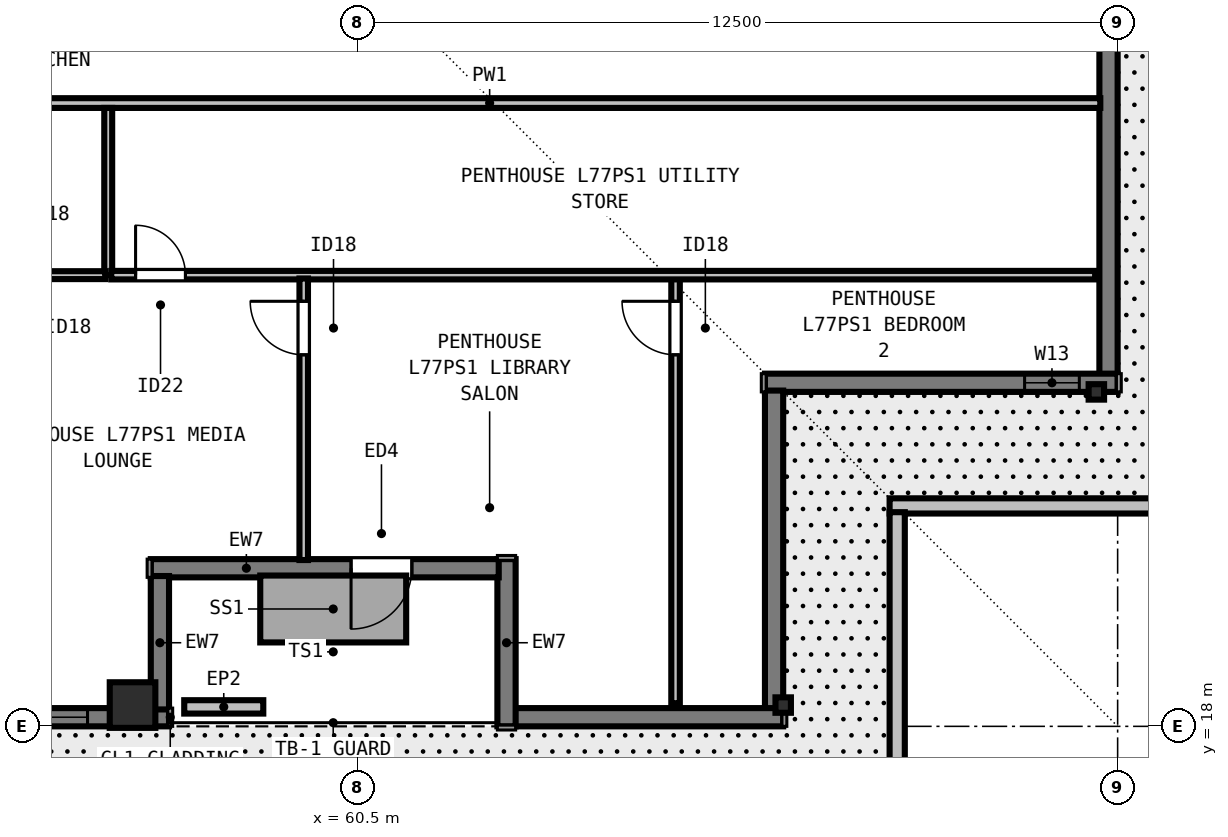
"""IFC4 building model, lengths in metres.
Left out: names, types, materials, properties, quantities, classifications, styles, units other than length and angle.
Written with IfcOpenShell. Run it as: python <this file> out.ifc"""

import sys

from ifc_helpers import new_model, si_unit, direction, frame, frame_2d, origin, origin_2d, place, context, subcontext, project, spatial, rectangle, i_section, extrude, element, fill, save


model = new_model("IFC4")
c1 = context("Model", 3, precision=1e-05, world=origin(), true_north=direction((0.0, 1.0)))
c2 = subcontext(c1, "Body", "Model", "MODEL_VIEW")
j1 = project(units=[si_unit("LENGTHUNIT", "METRE"), si_unit("PLANEANGLEUNIT", "RADIAN")], contexts=[c1])
p1 = place(None, origin())
s1 = spatial("IfcSite", under=j1, at=p1, CompositionType="ELEMENT")
p2 = place(p1, origin())
s2 = spatial("IfcBuilding", under=s1, at=p2, CompositionType="ELEMENT")
p3 = place(p2, frame((0.0, 0.0, 280.5)))
s3 = spatial("IfcBuildingStorey", under=s2, at=p3, CompositionType="ELEMENT", Elevation=280.5)
p4 = place(p3, frame((56.8, 18.35, 0.0), z_axis=(0.0, 0.0, 1.0), x_axis=(1.0, 0.0, 0.0)))
e1 = element("IfcColumn", 1, at=p4, inside=s3, PredefinedType="COLUMN", context=c2, shape_type="SweptSolid", body=[
    extrude(rectangle(XDim=0.75, YDim=0.75, at=origin_2d()), origin(), (0.0, 0.0, 1.0), 3.5),
])
for number, where, z_axis, x_axis in (
    (2, (67.5, 18.35, 0.0), (0.0, 0.0, 1.0), (1.0, 0.0, 0.0)),
    (3, (72.65, 23.5, 0.0), (0.0, 0.0, 1.0), (0.0, 1.0, 0.0)),
):
    element("IfcColumn", number, at=place(p3, frame(where, z_axis=z_axis, x_axis=x_axis)), inside=s3, PredefinedType="COLUMN", context=c2, shape_type="SweptSolid", body=[
        extrude(i_section(OverallWidth=0.254, OverallDepth=0.254, WebThickness=0.009, FlangeThickness=0.014, FilletRadius=0.013, at=origin_2d()), origin(), (0.0, 0.0, 1.0), 3.5),
    ])
p5 = place(p3, frame((74.5, 21.625, 0.0), z_axis=(0.0, 0.0, 1.0), x_axis=(-1.0, 0.0, 0.0)))
e4 = element("IfcWall", 4, at=p5, inside=s3, PredefinedType="PARAPET", context=c2, shape_type="SweptSolid", body=[
    extrude(rectangle(XDim=5.25, YDim=0.25, at=frame_2d((2.625, 0.0))), origin(), (0.0, 0.0, 1.0), 1.15),
])
p6 = place(p3, frame((69.375, 21.522, 0.0), z_axis=(0.0, 0.0, 1.0), x_axis=(0.0, -1.0, 0.0)))
e5 = element("IfcWall", 5, at=p6, inside=s3, PredefinedType="PARAPET", context=c2, shape_type="SweptSolid", body=[
    extrude(rectangle(XDim=4.794, YDim=0.25, at=frame_2d((2.397, 0.0))), origin(), (0.0, 0.0, 1.0), 1.15),
])
p7 = place(p3, frame((57.4, 18.15, 0.0), z_axis=(0.0, 0.0, 1.0), x_axis=(-1.0, 0.0, 0.0)))
e6 = element("IfcWall", 6, at=p7, inside=s3, PredefinedType="SOLIDWALL", context=c2, shape_type="SweptSolid", body=[
    extrude(rectangle(XDim=20.622, YDim=0.3, at=frame_2d((10.311, 0.0))), origin(), (0.0, 0.0, 1.0), 3.29),
])
p8 = place(p7, frame((1.34, 0.0, 0.8)))
e7 = element("IfcOpeningElement", 7, at=p8, cuts=e6, PredefinedType="OPENING", context=c2, shape_type="SweptSolid", body=[
    extrude(rectangle(XDim=2.0, YDim=1.758, at=frame_2d((1.0, 0.879))), frame((0.0, 0.16, 0.0), z_axis=(0.0, -1.0, 0.0), x_axis=(1.0, 0.0, 0.0)), (0.0, 0.0, 1.0), 0.32),
])
p9 = place(p7, frame((6.246, 0.0, 0.8)))
e8 = element("IfcOpeningElement", 8, at=p9, cuts=e6, PredefinedType="OPENING", context=c2, shape_type="SweptSolid", body=[
    extrude(rectangle(XDim=1.65, YDim=1.758, at=frame_2d((0.825, 0.879))), frame((0.0, 0.16, 0.0), z_axis=(0.0, -1.0, 0.0), x_axis=(1.0, 0.0, 0.0)), (0.0, 0.0, 1.0), 0.32),
])
p10 = place(p7, frame((10.801, 0.0, 0.8)))
e9 = element("IfcOpeningElement", 9, at=p10, cuts=e6, PredefinedType="OPENING", context=c2, shape_type="SweptSolid", body=[
    extrude(rectangle(XDim=2.0, YDim=1.758, at=frame_2d((1.0, 0.879))), frame((0.0, 0.16, 0.0), z_axis=(0.0, -1.0, 0.0), x_axis=(1.0, 0.0, 0.0)), (0.0, 0.0, 1.0), 0.32),
])
p11 = place(p7, frame((14.007, 0.0, 0.8)))
e10 = element("IfcOpeningElement", 10, at=p11, cuts=e6, PredefinedType="OPENING", context=c2, shape_type="SweptSolid", body=[
    extrude(rectangle(XDim=1.65, YDim=1.758, at=frame_2d((0.825, 0.879))), frame((0.0, 0.16, 0.0), z_axis=(0.0, -1.0, 0.0), x_axis=(1.0, 0.0, 0.0)), (0.0, 0.0, 1.0), 0.32),
])
p12 = place(p7, frame((4.7, 0.0, 0.0)))
e11 = element("IfcOpeningElement", 11, at=p12, cuts=e6, PredefinedType="OPENING", context=c2, shape_type="SweptSolid", body=[
    extrude(rectangle(XDim=1.15, YDim=2.15, at=frame_2d((0.575, 1.075))), frame((0.0, 0.16, 0.0), z_axis=(0.0, -1.0, 0.0), x_axis=(1.0, 0.0, 0.0)), (0.0, 0.0, 1.0), 0.32),
])
p13 = place(p3, frame((72.85, 54.5, 0.0), z_axis=(0.0, 0.0, 1.0), x_axis=(0.0, -1.0, 0.0)))
e12 = element("IfcWall", 12, at=p13, inside=s3, PredefinedType="SOLIDWALL", context=c2, shape_type="SweptSolid", body=[
    extrude(rectangle(XDim=30.722, YDim=0.3, at=frame_2d((15.361, 0.0))), origin(), (0.0, 0.0, 1.0), 3.29),
])
p14 = place(p13, frame((8.331, 0.0, 0.8)))
e13 = element("IfcOpeningElement", 13, at=p14, cuts=e12, PredefinedType="OPENING", context=c2, shape_type="SweptSolid", body=[
    extrude(rectangle(XDim=1.65, YDim=1.758, at=frame_2d((0.825, 0.879))), frame((0.0, 0.16, 0.0), z_axis=(0.0, -1.0, 0.0), x_axis=(1.0, 0.0, 0.0)), (0.0, 0.0, 1.0), 0.32),
])
p15 = place(p13, frame((11.593, 0.0, 0.8)))
e14 = element("IfcOpeningElement", 14, at=p15, cuts=e12, PredefinedType="OPENING", context=c2, shape_type="SweptSolid", body=[
    extrude(rectangle(XDim=2.0, YDim=1.758, at=frame_2d((1.0, 0.879))), frame((0.0, 0.16, 0.0), z_axis=(0.0, -1.0, 0.0), x_axis=(1.0, 0.0, 0.0)), (0.0, 0.0, 1.0), 0.32),
])
p16 = place(p13, frame((16.455, 0.0, 0.8)))
e15 = element("IfcOpeningElement", 15, at=p16, cuts=e12, PredefinedType="OPENING", context=c2, shape_type="SweptSolid", body=[
    extrude(rectangle(XDim=1.65, YDim=1.758, at=frame_2d((0.825, 0.879))), frame((0.0, 0.16, 0.0), z_axis=(0.0, -1.0, 0.0), x_axis=(1.0, 0.0, 0.0)), (0.0, 0.0, 1.0), 0.32),
])
p17 = place(p13, frame((20.967, 0.0, 0.8)))
e16 = element("IfcOpeningElement", 16, at=p17, cuts=e12, PredefinedType="OPENING", context=c2, shape_type="SweptSolid", body=[
    extrude(rectangle(XDim=2.0, YDim=1.758, at=frame_2d((1.0, 0.879))), frame((0.0, 0.16, 0.0), z_axis=(0.0, -1.0, 0.0), x_axis=(1.0, 0.0, 0.0)), (0.0, 0.0, 1.0), 0.32),
])
p18 = place(p3, frame((73.0, 23.65, 0.0), z_axis=(0.0, 0.0, 1.0), x_axis=(-1.0, 0.0, 0.0)))
e17 = element("IfcWall", 17, at=p18, inside=s3, PredefinedType="SOLIDWALL", context=c2, shape_type="SweptSolid", body=[
    extrude(rectangle(XDim=5.8, YDim=0.3, at=frame_2d((2.9, 0.0))), origin(), (0.0, 0.0, 1.0), 3.29),
])
p19 = place(p18, frame((0.63, 0.0, 0.8)))
e18 = element("IfcOpeningElement", 18, at=p19, cuts=e17, PredefinedType="OPENING", context=c2, shape_type="SweptSolid", body=[
    extrude(rectangle(XDim=0.9, YDim=1.75, at=frame_2d((0.45, 0.875))), frame((0.0, 0.16, 0.0), z_axis=(0.0, -1.0, 0.0), x_axis=(1.0, 0.0, 0.0)), (0.0, 0.0, 1.0), 0.32),
])
p20 = place(p3, frame((67.35, 23.522, 0.0), z_axis=(0.0, 0.0, 1.0), x_axis=(0.0, -1.0, 0.0)))
e19 = element("IfcWall", 19, at=p20, inside=s3, PredefinedType="SOLIDWALL", context=c2, shape_type="SweptSolid", body=[
    extrude(rectangle(XDim=5.244, YDim=0.3, at=frame_2d((2.622, 0.0))), origin(), (0.0, 0.0, 1.0), 3.29),
])
p21 = place(p3, frame((67.5, 18.15, 0.0), z_axis=(0.0, 0.0, 1.0), x_axis=(-1.0, 0.0, 0.0)))
e20 = element("IfcWall", 20, at=p21, inside=s3, PredefinedType="SOLIDWALL", context=c2, shape_type="SweptSolid", body=[
    extrude(rectangle(XDim=4.422, YDim=0.3, at=frame_2d((2.211, 0.0))), origin(), (0.0, 0.0, 1.0), 3.29),
])
p22 = place(p3, frame((62.95, 18.0, 0.0), z_axis=(0.0, 0.0, 1.0), x_axis=(0.0, 1.0, 0.0)))
e21 = element("IfcWall", 21, at=p22, inside=s3, PredefinedType="SOLIDWALL", context=c2, shape_type="SweptSolid", body=[
    extrude(rectangle(XDim=2.75, YDim=0.3, at=frame_2d((1.375, 0.0))), origin(), (0.0, 0.0, 1.0), 3.29),
])
p23 = place(p3, frame((62.822, 20.6, 0.0), z_axis=(0.0, 0.0, 1.0), x_axis=(-1.0, 0.0, 0.0)))
e22 = element("IfcWall", 22, at=p23, inside=s3, PredefinedType="SOLIDWALL", context=c2, shape_type="SweptSolid", body=[
    extrude(rectangle(XDim=5.722, YDim=0.3, at=frame_2d((2.861, 0.0))), origin(), (0.0, 0.0, 1.0), 3.29),
])
p24 = place(p23, frame((1.428, 0.0, 0.0)))
e23 = element("IfcOpeningElement", 23, at=p24, cuts=e22, PredefinedType="OPENING", context=c2, shape_type="SweptSolid", body=[
    extrude(rectangle(XDim=1.0, YDim=2.15, at=frame_2d((0.5, 1.075))), frame((0.0, 0.16, 0.0), z_axis=(0.0, -1.0, 0.0), x_axis=(1.0, 0.0, 0.0)), (0.0, 0.0, 1.0), 0.32),
])
p25 = place(p3, frame((57.25, 20.472, 0.0), z_axis=(0.0, 0.0, 1.0), x_axis=(0.0, -1.0, 0.0)))
e24 = element("IfcWall", 24, at=p25, inside=s3, PredefinedType="SOLIDWALL", context=c2, shape_type="SweptSolid", body=[
    extrude(rectangle(XDim=2.194, YDim=0.3, at=frame_2d((1.097, 0.0))), origin(), (0.0, 0.0, 1.0), 3.29),
])
p26 = place(p3, frame((57.65, 18.32, 0.0), z_axis=(0.0, 0.0, 1.0), x_axis=(1.0, 0.0, 0.0)))
e25 = element("IfcWall", 25, at=p26, inside=s3, PredefinedType="PARAPET", context=c2, shape_type="SweptSolid", body=[
    extrude(rectangle(XDim=1.3, YDim=0.22, at=frame_2d((0.65, 0.0))), origin(), (0.0, 0.0, 1.0), 0.55),
])
p27 = place(p3, frame((31.285, 28.25, 0.0), z_axis=(0.0, 0.0, 1.0), x_axis=(1.0, 0.0, 0.0)))
e26 = element("IfcWall", 26, at=p27, inside=s3, PredefinedType="PARTITIONING", context=c2, shape_type="SweptSolid", body=[
    extrude(rectangle(XDim=41.43, YDim=0.16, at=frame_2d((20.715, 0.0))), origin(), (0.0, 0.0, 1.0), 3.009),
])
p28 = place(p27, frame((20.235, 0.0, 0.0)))
e27 = element("IfcOpeningElement", 27, at=p28, cuts=e26, PredefinedType="OPENING", context=c2, shape_type="SweptSolid", body=[
    extrude(rectangle(XDim=0.96, YDim=2.18, at=frame_2d((0.48, 1.09))), frame((0.0, 0.09, 0.0), z_axis=(0.0, -1.0, 0.0), x_axis=(1.0, 0.0, 0.0)), (0.0, 0.0, 1.0), 0.18),
])
p29 = place(p3, frame((56.4, 25.42, 0.0), z_axis=(0.0, 0.0, 1.0), x_axis=(0.0, 1.0, 0.0)))
e28 = element("IfcWall", 28, at=p29, inside=s3, PredefinedType="PLUMBINGWALL", context=c2, shape_type="SweptSolid", body=[
    extrude(rectangle(XDim=2.75, YDim=0.13, at=frame_2d((1.375, 0.0))), origin(), (0.0, 0.0, 1.0), 3.29),
])
p30 = place(p3, frame((53.2, 25.42, 0.0), z_axis=(0.0, 0.0, 1.0), x_axis=(1.0, 0.0, 0.0)))
e29 = element("IfcWall", 29, at=p30, inside=s3, PredefinedType="PLUMBINGWALL", context=c2, shape_type="SweptSolid", body=[
    extrude(rectangle(XDim=3.15, YDim=0.13, at=frame_2d((1.575, 0.0))), origin(), (0.0, 0.0, 1.0), 3.29),
])
p31 = place(p3, frame((65.73, 18.38, 0.0), z_axis=(0.0, 0.0, 1.0), x_axis=(0.0, 1.0, 0.0)))
e30 = element("IfcWall", 30, at=p31, inside=s3, PredefinedType="PARTITIONING", context=c2, shape_type="SweptSolid", body=[
    extrude(rectangle(XDim=7.08, YDim=0.14, at=frame_2d((3.54, 0.0))), origin(), (0.0, 0.0, 1.0), 2.653),
])
p32 = place(p31, frame((5.73, 0.0, 0.0)))
e31 = element("IfcOpeningElement", 31, at=p32, cuts=e30, PredefinedType="OPENING", context=c2, shape_type="SweptSolid", body=[
    extrude(rectangle(XDim=0.88, YDim=2.1, at=frame_2d((0.44, 1.05))), frame((0.0, 0.08, 0.0), z_axis=(0.0, -1.0, 0.0), x_axis=(1.0, 0.0, 0.0)), (0.0, 0.0, 1.0), 0.16),
])
p33 = place(p3, frame((56.45, 25.42, 0.0), z_axis=(0.0, 0.0, 1.0), x_axis=(1.0, 0.0, 0.0)))
e32 = element("IfcWall", 32, at=p33, inside=s3, PredefinedType="PARTITIONING", context=c2, shape_type="SweptSolid", body=[
    extrude(rectangle(XDim=16.18, YDim=0.14, at=frame_2d((8.09, 0.0))), origin(), (0.0, 0.0, 1.0), 3.009),
])
p34 = place(p33, frame((0.4, 0.0, 0.0)))
e33 = element("IfcOpeningElement", 33, at=p34, cuts=e32, PredefinedType="OPENING", context=c2, shape_type="SweptSolid", body=[
    extrude(rectangle(XDim=0.82, YDim=2.1, at=frame_2d((0.41, 1.05))), frame((0.0, 0.08, 0.0), z_axis=(0.0, -1.0, 0.0), x_axis=(1.0, 0.0, 0.0)), (0.0, 0.0, 1.0), 0.16),
])
p35 = place(p3, frame((59.615, 20.735, 0.0), z_axis=(0.0, 0.0, 1.0), x_axis=(0.0, 1.0, 0.0)))
e34 = element("IfcWall", 34, at=p35, inside=s3, PredefinedType="PARTITIONING", context=c2, shape_type="SweptSolid", body=[
    extrude(rectangle(XDim=4.63, YDim=0.14, at=frame_2d((2.315, 0.0))), origin(), (0.0, 0.0, 1.0), 3.29),
])
p36 = place(p35, frame((3.375, 0.0, 0.0)))
e35 = element("IfcOpeningElement", 35, at=p36, cuts=e34, PredefinedType="OPENING", context=c2, shape_type="SweptSolid", body=[
    extrude(rectangle(XDim=0.88, YDim=2.1, at=frame_2d((0.44, 1.05))), frame((0.0, 0.08, 0.0), z_axis=(0.0, -1.0, 0.0), x_axis=(1.0, 0.0, 0.0)), (0.0, 0.0, 1.0), 0.16),
])
p37 = place(p8, origin())
e36 = element("IfcWindow", 36, at=p37, inside=s3, PartitioningType="SINGLE_PANEL", PredefinedType="WINDOW", context=c2, shape_type="SweptSolid", body=[
    extrude(rectangle(XDim=2.0, YDim=1.758, at=frame_2d((1.0, 0.879))), frame((0.0, -0.05, 0.0), z_axis=(0.0, -1.0, 0.0), x_axis=(1.0, 0.0, 0.0)), (0.0, 0.0, 1.0), 0.06),
])
fill(e7, e36)
p38 = place(p24, origin())
e37 = element("IfcDoor", 37, at=p38, inside=s3, OperationType="SINGLE_SWING_RIGHT", PredefinedType="DOOR", context=c2, shape_type="SweptSolid", body=[
    extrude(rectangle(XDim=1.0, YDim=2.15, at=frame_2d((0.5, 1.075))), frame((0.0, 0.025, 0.0), z_axis=(0.0, -1.0, 0.0), x_axis=(1.0, 0.0, 0.0)), (0.0, 0.0, 1.0), 0.05),
])
fill(e23, e37)
p39 = place(p19, origin())
e38 = element("IfcWindow", 38, at=p39, inside=s3, PartitioningType="SINGLE_PANEL", PredefinedType="WINDOW", context=c2, shape_type="SweptSolid", body=[
    extrude(rectangle(XDim=0.9, YDim=1.75, at=frame_2d((0.45, 0.875))), frame((0.0, -0.04, 0.0), z_axis=(0.0, -1.0, 0.0), x_axis=(1.0, 0.0, 0.0)), (0.0, 0.0, 1.0), 0.06),
])
fill(e18, e38)
p40 = place(p34, origin())
e39 = element("IfcDoor", 39, at=p40, inside=s3, OperationType="SINGLE_SWING_LEFT", PredefinedType="DOOR", context=c2, shape_type="SweptSolid", body=[
    extrude(rectangle(XDim=0.82, YDim=2.1, at=frame_2d((0.41, 1.05))), frame((0.0, 0.025, 0.0), z_axis=(0.0, -1.0, 0.0), x_axis=(1.0, 0.0, 0.0)), (0.0, 0.0, 1.0), 0.05),
])
fill(e33, e39)
p41 = place(p32, origin())
e40 = element("IfcDoor", 40, at=p41, inside=s3, OperationType="SINGLE_SWING_RIGHT", PredefinedType="DOOR", context=c2, shape_type="SweptSolid", body=[
    extrude(rectangle(XDim=0.88, YDim=2.1, at=frame_2d((0.44, 1.05))), frame((0.0, 0.025, 0.0), z_axis=(0.0, -1.0, 0.0), x_axis=(1.0, 0.0, 0.0)), (0.0, 0.0, 1.0), 0.05),
])
fill(e31, e40)
p42 = place(p36, origin())
e41 = element("IfcDoor", 41, at=p42, inside=s3, OperationType="SINGLE_SWING_RIGHT", PredefinedType="DOOR", context=c2, shape_type="SweptSolid", body=[
    extrude(rectangle(XDim=0.88, YDim=2.1, at=frame_2d((0.44, 1.05))), frame((0.0, 0.025, 0.0), z_axis=(0.0, -1.0, 0.0), x_axis=(1.0, 0.0, 0.0)), (0.0, 0.0, 1.0), 0.05),
])
fill(e35, e41)
save(model, sys.argv[1])
